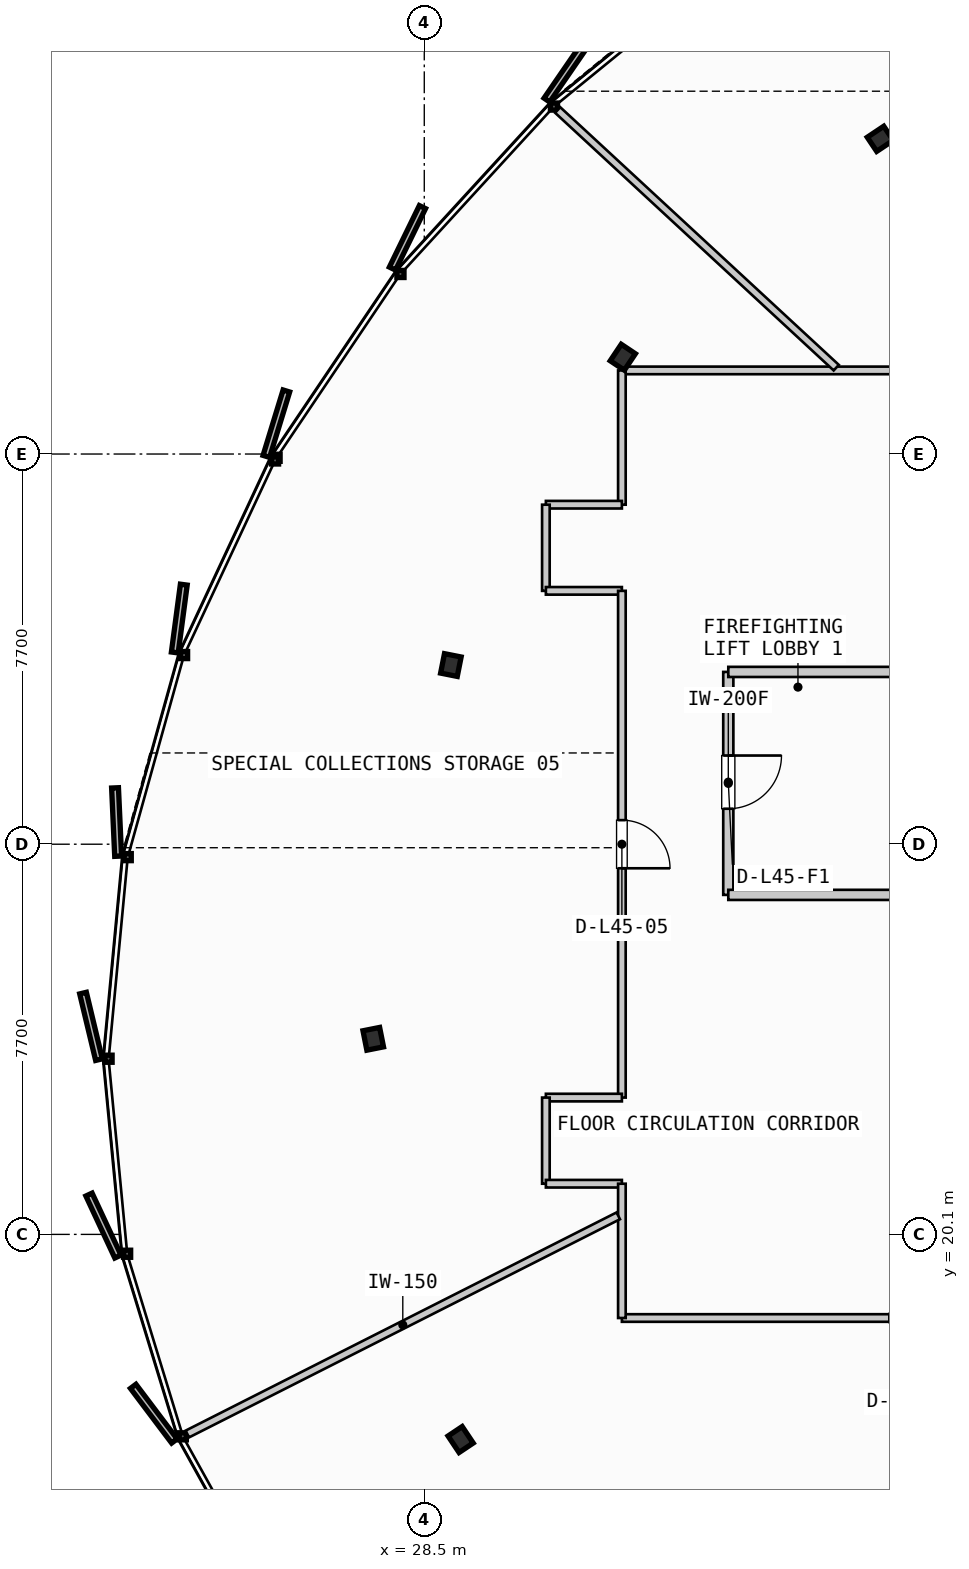
"""IFC4 building model, lengths in metres.
Left out: names, types, materials, properties, quantities, classifications, styles, units other than length and angle.
Written with IfcOpenShell. Run it as: python <this file> out.ifc"""

import sys

from ifc_helpers import new_model, si_unit, direction, frame, frame_2d, origin, origin_2d, place, context, subcontext, project, spatial, rectangle, i_section, extrude, source, transform, mapped, element, fill, save


model = new_model("IFC4")
c1 = context("Model", 3, precision=1e-05, world=origin(), true_north=direction((0.0, 1.0)))
c2 = subcontext(c1, "Body", "Model", "MODEL_VIEW")
j1 = project(units=[si_unit("LENGTHUNIT", "METRE"), si_unit("PLANEANGLEUNIT", "RADIAN")], contexts=[c1])
p1 = place(None, origin())
s1 = spatial("IfcSite", under=j1, at=p1, CompositionType="ELEMENT")
p2 = place(p1, origin())
s2 = spatial("IfcBuilding", under=s1, at=p2, CompositionType="ELEMENT")
p3 = place(p2, frame((0.0, 0.0, 176.4)))
s3 = spatial("IfcBuildingStorey", under=s2, at=p3, CompositionType="ELEMENT", Elevation=176.4)
m1 = source(origin(), c2, "Body", "SweptSolid", [
    extrude(i_section(OverallWidth=0.391, OverallDepth=0.335, WebThickness=0.023, FlangeThickness=0.034, FilletRadius=0.015, at=origin_2d()), origin(), (0.0, 0.0, 1.0), 3.26),
])
for number, where, z_axis, x_axis in (
    (1, (37.499, 41.72, 0.0), (0.0, 0.0, 1.0), (-0.556, 0.831, 0.0)),
    (2, (32.418, 37.409, 0.0), (0.0, 0.0, 1.0), (-0.831, 0.556, 0.0)),
    (3, (29.025, 31.336, 0.0), (0.0, 0.0, 1.0), (-0.981, 0.195, 0.0)),
    (4, (27.493, 23.96, 0.0), (0.0, 0.0, 1.0), (-0.981, -0.195, 0.0)),
    (5, (29.218, 16.052, 0.0), (0.0, 0.0, 1.0), (-0.831, -0.556, 0.0)),
):
    element("IfcColumn", number, at=place(p3, frame(where, z_axis=z_axis, x_axis=x_axis)), inside=s3, PredefinedType="COLUMN", context=c2, shape_type="MappedRepresentation", body=[
        mapped(m1, transform((0.0, 0.0, 0.0), scale=1.0)),
    ])
p4 = place(p3, frame((34.5, 31.2, 0.0), z_axis=(0.0, 0.0, 1.0), x_axis=(0.0, -1.0, 0.0)))
e6 = element("IfcWall", 6, at=p4, inside=s3, PredefinedType="PARTITIONING", context=c2, shape_type="SweptSolid", body=[
    extrude(rectangle(XDim=4.4, YDim=0.2, at=frame_2d((2.2, 0.0))), origin(), (0.0, 0.0, 1.0), 2.28),
])
p5 = place(p4, frame((1.65, 0.0, 0.0)))
e7 = element("IfcOpeningElement", 7, at=p5, cuts=e6, PredefinedType="OPENING", context=c2, shape_type="SweptSolid", body=[
    extrude(rectangle(XDim=1.05, YDim=2.15, at=frame_2d((0.525, 1.075))), frame((0.0, 0.11, 0.0), z_axis=(0.0, -1.0, 0.0), x_axis=(1.0, 0.0, 0.0)), (0.0, 0.0, 1.0), 0.22),
])
for number, where, z_axis, x_axis in (
    (8, (34.5, 26.8, 0.0), (0.0, 0.0, 1.0), (1.0, 0.0, 0.0)),
    (9, (34.5, 31.2, 0.0), (0.0, 0.0, 1.0), (1.0, 0.0, 0.0)),
):
    element("IfcWall", number, at=place(p3, frame(where, z_axis=z_axis, x_axis=x_axis)), inside=s3, PredefinedType="PARTITIONING", context=c2, shape_type="SweptSolid", body=[
        extrude(rectangle(XDim=3.215, YDim=0.2, at=frame_2d((1.607, 0.0))), origin(), (0.0, 0.0, 1.0), 2.28),
    ])
p6 = place(p3, frame((32.4, 18.45, 0.0), z_axis=(0.0, 0.0, 1.0), x_axis=(1.0, 0.0, 0.0)))
e10 = element("IfcWall", 10, at=p6, inside=s3, PredefinedType="PARTITIONING", context=c2, shape_type="SweptSolid", body=[
    extrude(rectangle(XDim=28.35, YDim=0.15, at=frame_2d((14.175, 0.0))), origin(), (0.0, 0.0, 1.0), 2.28),
])
p7 = place(p6, frame((5.278, 0.0, 0.0)))
e11 = element("IfcOpeningElement", 11, at=p7, cuts=e10, PredefinedType="OPENING", context=c2, shape_type="SweptSolid", body=[
    extrude(rectangle(XDim=0.95, YDim=2.15, at=frame_2d((0.475, 1.075))), frame((0.0, 0.085, 0.0), z_axis=(0.0, -1.0, 0.0), x_axis=(1.0, 0.0, 0.0)), (0.0, 0.0, 1.0), 0.17),
])
p8 = place(p6, frame((18.864, 0.0, 0.0)))
e12 = element("IfcOpeningElement", 12, at=p8, cuts=e10, PredefinedType="OPENING", context=c2, shape_type="SweptSolid", body=[
    extrude(rectangle(XDim=0.95, YDim=2.15, at=frame_2d((0.475, 1.075))), frame((0.0, 0.085, 0.0), z_axis=(0.0, -1.0, 0.0), x_axis=(1.0, 0.0, 0.0)), (0.0, 0.0, 1.0), 0.17),
])
p9 = place(p3, frame((60.75, 37.15, 0.0), z_axis=(0.0, 0.0, 1.0), x_axis=(-1.0, 0.0, 0.0)))
e13 = element("IfcWall", 13, at=p9, inside=s3, PredefinedType="PARTITIONING", context=c2, shape_type="SweptSolid", body=[
    extrude(rectangle(XDim=28.35, YDim=0.15, at=frame_2d((14.175, 0.0))), origin(), (0.0, 0.0, 1.0), 2.28),
])
p10 = place(p9, frame((11.912, 0.0, 0.0)))
e14 = element("IfcOpeningElement", 14, at=p10, cuts=e13, PredefinedType="OPENING", context=c2, shape_type="SweptSolid", body=[
    extrude(rectangle(XDim=0.95, YDim=2.15, at=frame_2d((0.475, 1.075))), frame((0.0, 0.085, 0.0), z_axis=(0.0, -1.0, 0.0), x_axis=(1.0, 0.0, 0.0)), (0.0, 0.0, 1.0), 0.17),
])
p11 = place(p3, frame((32.4, 37.15, 0.0), z_axis=(0.0, 0.0, 1.0), x_axis=(0.0, -1.0, 0.0)))
e15 = element("IfcWall", 15, at=p11, inside=s3, PredefinedType="PARTITIONING", context=c2, shape_type="SweptSolid", body=[
    extrude(rectangle(XDim=2.65, YDim=0.15, at=frame_2d((1.325, 0.0))), origin(), (0.0, 0.0, 1.0), 2.28),
])
p12 = place(p3, frame((32.4, 34.5, 0.0), z_axis=(0.0, 0.0, 1.0), x_axis=(-1.0, 0.0, 0.0)))
e16 = element("IfcWall", 16, at=p12, inside=s3, PredefinedType="PARTITIONING", context=c2, shape_type="SweptSolid", body=[
    extrude(rectangle(XDim=1.5, YDim=0.15, at=frame_2d((0.75, 0.0))), origin(), (0.0, 0.0, 1.0), 2.28),
])
p13 = place(p3, frame((30.9, 34.5, 0.0), z_axis=(0.0, 0.0, 1.0), x_axis=(0.0, -1.0, 0.0)))
e17 = element("IfcWall", 17, at=p13, inside=s3, PredefinedType="PARTITIONING", context=c2, shape_type="SweptSolid", body=[
    extrude(rectangle(XDim=1.7, YDim=0.15, at=frame_2d((0.85, 0.0))), origin(), (0.0, 0.0, 1.0), 2.28),
])
p14 = place(p3, frame((30.9, 32.8, 0.0), z_axis=(0.0, 0.0, 1.0), x_axis=(1.0, 0.0, 0.0)))
e18 = element("IfcWall", 18, at=p14, inside=s3, PredefinedType="PARTITIONING", context=c2, shape_type="SweptSolid", body=[
    extrude(rectangle(XDim=1.5, YDim=0.15, at=frame_2d((0.75, 0.0))), origin(), (0.0, 0.0, 1.0), 2.28),
])
p15 = place(p3, frame((32.4, 32.8, 0.0), z_axis=(0.0, 0.0, 1.0), x_axis=(0.0, -1.0, 0.0)))
e19 = element("IfcWall", 19, at=p15, inside=s3, PredefinedType="PARTITIONING", context=c2, shape_type="SweptSolid", body=[
    extrude(rectangle(XDim=10.0, YDim=0.15, at=frame_2d((5.0, 0.0))), origin(), (0.0, 0.0, 1.0), 2.28),
])
p16 = place(p15, frame((4.525, 0.0, 0.0)))
e20 = element("IfcOpeningElement", 20, at=p16, cuts=e19, PredefinedType="OPENING", context=c2, shape_type="SweptSolid", body=[
    extrude(rectangle(XDim=0.95, YDim=2.15, at=frame_2d((0.475, 1.075))), frame((0.0, 0.085, 0.0), z_axis=(0.0, -1.0, 0.0), x_axis=(1.0, 0.0, 0.0)), (0.0, 0.0, 1.0), 0.17),
])
p17 = place(p3, frame((32.4, 22.8, 0.0), z_axis=(0.0, 0.0, 1.0), x_axis=(-1.0, 0.0, 0.0)))
e21 = element("IfcWall", 21, at=p17, inside=s3, PredefinedType="PARTITIONING", context=c2, shape_type="SweptSolid", body=[
    extrude(rectangle(XDim=1.5, YDim=0.15, at=frame_2d((0.75, 0.0))), origin(), (0.0, 0.0, 1.0), 2.28),
])
p18 = place(p3, frame((30.9, 22.8, 0.0), z_axis=(0.0, 0.0, 1.0), x_axis=(0.0, -1.0, 0.0)))
e22 = element("IfcWall", 22, at=p18, inside=s3, PredefinedType="PARTITIONING", context=c2, shape_type="SweptSolid", body=[
    extrude(rectangle(XDim=1.7, YDim=0.15, at=frame_2d((0.85, 0.0))), origin(), (0.0, 0.0, 1.0), 2.28),
])
p19 = place(p3, frame((30.9, 21.1, 0.0), z_axis=(0.0, 0.0, 1.0), x_axis=(1.0, 0.0, 0.0)))
e23 = element("IfcWall", 23, at=p19, inside=s3, PredefinedType="PARTITIONING", context=c2, shape_type="SweptSolid", body=[
    extrude(rectangle(XDim=1.5, YDim=0.15, at=frame_2d((0.75, 0.0))), origin(), (0.0, 0.0, 1.0), 2.28),
])
p20 = place(p3, frame((32.4, 21.1, 0.0), z_axis=(0.0, 0.0, 1.0), x_axis=(0.0, -1.0, 0.0)))
e24 = element("IfcWall", 24, at=p20, inside=s3, PredefinedType="PARTITIONING", context=c2, shape_type="SweptSolid", body=[
    extrude(rectangle(XDim=2.65, YDim=0.15, at=frame_2d((1.325, 0.0))), origin(), (0.0, 0.0, 1.0), 2.28),
])
p21 = place(p3, frame((32.329, 20.466, 0.0), z_axis=(0.0, 0.0, 1.0), x_axis=(-0.8921776688, -0.451684632564, 0.0)))
e25 = element("IfcWall", 25, at=p21, inside=s3, PredefinedType="PARTITIONING", context=c2, shape_type="SweptSolid", body=[
    extrude(rectangle(XDim=9.533, YDim=0.15, at=frame_2d((4.767, 0.0))), origin(), (0.0, 0.0, 1.0), 2.28),
])
p22 = place(p3, frame((36.63, 37.204, 0.0), z_axis=(0.0, 0.0, 1.0), x_axis=(-0.734135600116, 0.679002887064, 0.0)))
e26 = element("IfcWall", 26, at=p22, inside=s3, PredefinedType="PARTITIONING", context=c2, shape_type="SweptSolid", body=[
    extrude(rectangle(XDim=7.488, YDim=0.15, at=frame_2d((3.744, 0.0))), origin(), (0.0, 0.0, 1.0), 2.28),
])
m2 = source(origin(), c2, "Body", "SweptSolid", [
    extrude(rectangle(XDim=1.05, YDim=2.15, at=frame_2d((0.525, 1.075))), frame((0.0, 0.025, 0.0), z_axis=(0.0, -1.0, 0.0), x_axis=(1.0, 0.0, 0.0)), (0.0, 0.0, 1.0), 0.05),
])
p23 = place(p5, origin())
e27 = element("IfcDoor", 27, at=p23, inside=s3, OperationType="SINGLE_SWING_LEFT", PredefinedType="DOOR", context=c2, shape_type="MappedRepresentation", body=[
    mapped(m2, transform((0.0, 0.0, 0.0), scale=1.0)),
])
fill(e7, e27)
m3 = source(origin(), c2, "Body", "SweptSolid", [
    extrude(rectangle(XDim=0.95, YDim=2.15, at=frame_2d((0.475, 1.075))), frame((0.0, 0.025, 0.0), z_axis=(0.0, -1.0, 0.0), x_axis=(1.0, 0.0, 0.0)), (0.0, 0.0, 1.0), 0.05),
])
p24 = place(p7, origin())
e28 = element("IfcDoor", 28, at=p24, inside=s3, OperationType="SINGLE_SWING_RIGHT", PredefinedType="DOOR", context=c2, shape_type="MappedRepresentation", body=[
    mapped(m3, transform((0.0, 0.0, 0.0), scale=1.0)),
])
fill(e11, e28)
p25 = place(p16, origin())
e29 = element("IfcDoor", 29, at=p25, inside=s3, OperationType="SINGLE_SWING_RIGHT", PredefinedType="DOOR", context=c2, shape_type="MappedRepresentation", body=[
    mapped(m3, transform((0.0, 0.0, 0.0), scale=1.0)),
])
fill(e20, e29)
save(model, sys.argv[1])
